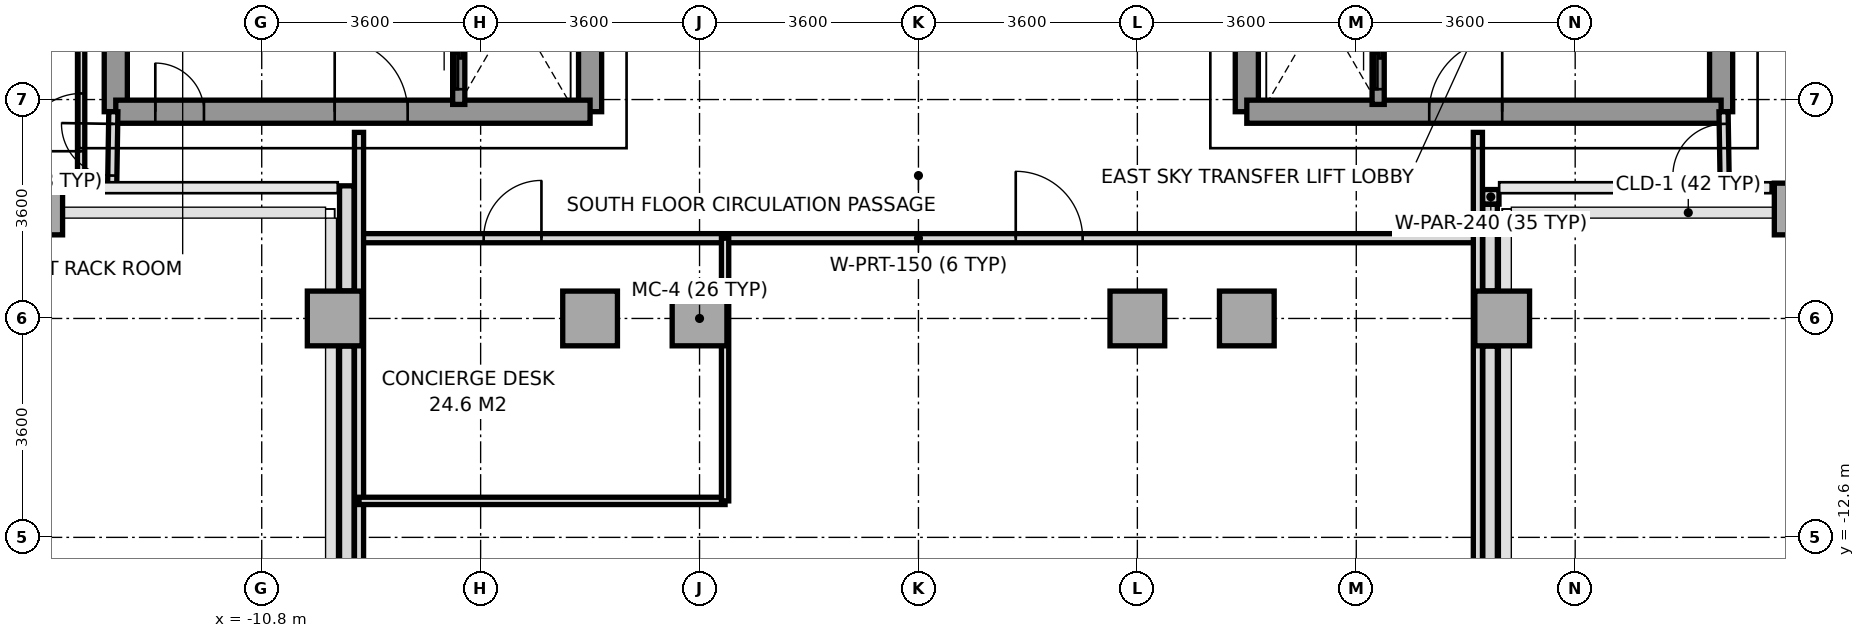
"""IFC4 building model, lengths in metres.
Left out: names, types, materials, properties, quantities, classifications, styles, units other than length and angle.
Written with IfcOpenShell. Run it as: python <this file> out.ifc"""

import sys

from ifc_helpers import new_model, si_unit, direction, frame, frame_2d, origin, origin_2d, place, context, subcontext, project, spatial, rectangle, extrude, source, transform, mapped, element, fill, save


model = new_model("IFC4")
c1 = context("Model", 3, precision=1e-05, world=origin(), true_north=direction((0.0, 1.0)))
c2 = subcontext(c1, "Body", "Model", "MODEL_VIEW")
j1 = project(units=[si_unit("LENGTHUNIT", "METRE"), si_unit("PLANEANGLEUNIT", "RADIAN")], contexts=[c1])
p1 = place(None, origin())
s1 = spatial("IfcSite", under=j1, at=p1, CompositionType="ELEMENT")
p2 = place(p1, origin())
s2 = spatial("IfcBuilding", under=s1, at=p2, CompositionType="ELEMENT")
p3 = place(p2, frame((0.0, 0.0, 177.4)))
s3 = spatial("IfcBuildingStorey", under=s2, at=p3, CompositionType="ELEMENT", Elevation=177.4)
m1 = source(origin(), c2, "Body", "SweptSolid", [
    extrude(rectangle(XDim=0.65, YDim=0.85, at=origin_2d()), origin(), (0.0, 0.0, 1.0), 3.2),
])
p4 = place(p3, frame((-14.4, -7.2, 0.0), z_axis=(0.0, 0.0, 1.0), x_axis=(1.0, 0.0, 0.0)))
e1 = element("IfcColumn", 1, at=p4, inside=s3, PredefinedType="COLUMN", context=c2, shape_type="MappedRepresentation", body=[
    mapped(m1, transform((0.0, 0.0, 0.0), x_axis=(1.0, 0.0, 0.0), y_axis=(0.0, 1.0, 0.0), z_axis=(0.0, 0.0, 1.0), scale=1.0)),
])
m2 = source(origin(), c2, "Body", "SweptSolid", [
    extrude(rectangle(XDim=0.9, YDim=0.9, at=origin_2d()), origin(), (0.0, 0.0, 1.0), 3.2),
])
for number, where, z_axis, x_axis in (
    (2, (-9.6, -9.0, 0.0), (0.0, 0.0, 1.0), (1.0, 0.0, 0.0)),
    (3, (-5.4, -9.0, 0.0), (0.0, 0.0, 1.0), (1.0, 0.0, 0.0)),
    (4, (-3.6, -9.0, 0.0), (0.0, 0.0, 1.0), (1.0, 0.0, 0.0)),
    (5, (3.6, -9.0, 0.0), (0.0, 0.0, 1.0), (1.0, 0.0, 0.0)),
    (6, (5.4, -9.0, 0.0), (0.0, 0.0, 1.0), (1.0, 0.0, 0.0)),
    (7, (9.6, -9.0, 0.0), (0.0, 0.0, 1.0), (1.0, 0.0, 0.0)),
):
    element("IfcColumn", number, at=place(p3, frame(where, z_axis=z_axis, x_axis=x_axis)), inside=s3, PredefinedType="COLUMN", context=c2, shape_type="MappedRepresentation", body=[
        mapped(m2, transform((0.0, 0.0, 0.0), x_axis=(1.0, 0.0, 0.0), y_axis=(0.0, 1.0, 0.0), z_axis=(0.0, 0.0, 1.0), scale=1.0)),
    ])
p5 = place(p3, frame((14.4, -7.2, 0.0), z_axis=(0.0, 0.0, 1.0), x_axis=(1.0, 0.0, 0.0)))
e8 = element("IfcColumn", 8, at=p5, inside=s3, PredefinedType="COLUMN", context=c2, shape_type="MappedRepresentation", body=[
    mapped(m1, transform((0.0, 0.0, 0.0), x_axis=(1.0, 0.0, 0.0), y_axis=(0.0, 1.0, 0.0), z_axis=(0.0, 0.0, 1.0), scale=1.0)),
])
p6 = place(p3, frame((9.547, -7.0, 0.0), z_axis=(0.0, 0.0, 1.0), x_axis=(-1.0, 0.0, 0.0)))
e9 = element("IfcWall", 9, at=p6, inside=s3, PredefinedType="PARAPET", context=c2, shape_type="SweptSolid", body=[
    extrude(rectangle(XDim=0.269, YDim=0.24, at=frame_2d((0.135, 0.0))), origin(), (0.0, 0.0, 1.0), 1.15),
])
p7 = place(p3, frame((9.4, -7.123, 0.0), z_axis=(0.0, 0.0, 1.0), x_axis=(0.0, -1.0, 0.0)))
e10 = element("IfcWall", 10, at=p7, inside=s3, PredefinedType="PARAPET", context=c2, shape_type="SweptSolid", body=[
    extrude(rectangle(XDim=1.424, YDim=0.24, at=frame_2d((0.712, 0.0))), origin(), (0.0, 0.0, 1.0), 1.15),
])
p8 = place(p3, frame((9.4, -9.453, 0.0), z_axis=(0.0, 0.0, 1.0), x_axis=(0.0, -1.0, 0.0)))
e11 = element("IfcWall", 11, at=p8, inside=s3, PredefinedType="PARAPET", context=c2, shape_type="SweptSolid", body=[
    extrude(rectangle(XDim=6.15, YDim=0.24, at=frame_2d((3.075, 0.0))), origin(), (0.0, 0.0, 1.0), 1.15),
])
p9 = place(p3, frame((-9.4, -15.358, 0.0), z_axis=(0.0, 0.0, 1.0), x_axis=(0.0, 1.0, 0.0)))
e12 = element("IfcWall", 12, at=p9, inside=s3, PredefinedType="PARAPET", context=c2, shape_type="SweptSolid", body=[
    extrude(rectangle(XDim=5.905, YDim=0.24, at=frame_2d((2.952, 0.0))), origin(), (0.0, 0.0, 1.0), 1.15),
])
p10 = place(p3, frame((-9.4, -8.547, 0.0), z_axis=(0.0, 0.0, 1.0), x_axis=(0.0, 1.0, 0.0)))
e13 = element("IfcWall", 13, at=p10, inside=s3, PredefinedType="PARAPET", context=c2, shape_type="SweptSolid", body=[
    extrude(rectangle(XDim=1.728, YDim=0.24, at=frame_2d((0.864, 0.0))), origin(), (0.0, 0.0, 1.0), 1.15),
])
p11 = place(p3, frame((-13.2, -5.6, 0.0), z_axis=(0.0, 0.0, 1.0), x_axis=(0.0, 1.0, 0.0)))
e14 = element("IfcWall", 14, at=p11, inside=s3, PredefinedType="SHEAR", context=c2, shape_type="SweptSolid", body=[
    extrude(rectangle(XDim=11.2, YDim=0.38, at=frame_2d((5.6, 0.0))), origin(), (0.0, 0.0, 1.0), 3.2),
])
p12 = place(p3, frame((-5.4, -5.6, 0.0), z_axis=(0.0, 0.0, 1.0), x_axis=(0.0, 1.0, 0.0)))
e15 = element("IfcWall", 15, at=p12, inside=s3, PredefinedType="SHEAR", context=c2, shape_type="SweptSolid", body=[
    extrude(rectangle(XDim=12.5, YDim=0.38, at=frame_2d((6.25, 0.0))), origin(), (0.0, 0.0, 1.0), 3.2),
])
p13 = place(p12, frame((4.55, 0.0, 0.0)))
e16 = element("IfcOpeningElement", 16, at=p13, cuts=e15, PredefinedType="OPENING", context=c2, shape_type="SweptSolid", body=[
    extrude(rectangle(XDim=1.2, YDim=2.2, at=frame_2d((0.6, 1.1))), frame((0.0, 0.2, 0.0), z_axis=(0.0, -1.0, 0.0), x_axis=(1.0, 0.0, 0.0)), (0.0, 0.0, 1.0), 0.4),
])
p14 = place(p12, frame((10.45, 0.0, 0.0)))
e17 = element("IfcOpeningElement", 17, at=p14, cuts=e15, PredefinedType="OPENING", context=c2, shape_type="SweptSolid", body=[
    extrude(rectangle(XDim=1.2, YDim=2.2, at=frame_2d((0.6, 1.1))), frame((0.0, 0.2, 0.0), z_axis=(0.0, -1.0, 0.0), x_axis=(1.0, 0.0, 0.0)), (0.0, 0.0, 1.0), 0.4),
])
p15 = place(p12, frame((6.86, 0.0, 0.0)))
e18 = element("IfcOpeningElement", 18, at=p15, cuts=e15, PredefinedType="OPENING", context=c2, shape_type="SweptSolid", body=[
    extrude(rectangle(XDim=0.8, YDim=2.1, at=frame_2d((0.4, 1.05))), frame((0.0, 0.2, 0.0), z_axis=(0.0, -1.0, 0.0), x_axis=(1.0, 0.0, 0.0)), (0.0, 0.0, 1.0), 0.4),
])
p16 = place(p3, frame((-13.2, -5.6, 0.0), z_axis=(0.0, 0.0, 1.0), x_axis=(1.0, 0.0, 0.0)))
e19 = element("IfcWall", 19, at=p16, inside=s3, PredefinedType="SHEAR", context=c2, shape_type="SweptSolid", body=[
    extrude(rectangle(XDim=7.8, YDim=0.38, at=frame_2d((3.9, 0.0))), origin(), (0.0, 0.0, 1.0), 3.2),
])
p17 = place(p16, frame((3.6, 0.0, 0.0)))
e20 = element("IfcOpeningElement", 20, at=p17, cuts=e19, PredefinedType="OPENING", context=c2, shape_type="SweptSolid", body=[
    extrude(rectangle(XDim=1.2, YDim=2.2, at=frame_2d((0.6, 1.1))), frame((0.0, 0.2, 0.0), z_axis=(0.0, -1.0, 0.0), x_axis=(1.0, 0.0, 0.0)), (0.0, 0.0, 1.0), 0.4),
])
p18 = place(p16, frame((0.65, 0.0, 0.0)))
e21 = element("IfcOpeningElement", 21, at=p18, cuts=e19, PredefinedType="OPENING", context=c2, shape_type="SweptSolid", body=[
    extrude(rectangle(XDim=0.8, YDim=2.1, at=frame_2d((0.4, 1.05))), frame((0.0, 0.2, 0.0), z_axis=(0.0, -1.0, 0.0), x_axis=(1.0, 0.0, 0.0)), (0.0, 0.0, 1.0), 0.4),
])
p19 = place(p3, frame((13.2, -5.6, 0.0), z_axis=(0.0, 0.0, 1.0), x_axis=(0.0, 1.0, 0.0)))
e22 = element("IfcWall", 22, at=p19, inside=s3, PredefinedType="SHEAR", context=c2, shape_type="SweptSolid", body=[
    extrude(rectangle(XDim=11.2, YDim=0.38, at=frame_2d((5.6, 0.0))), origin(), (0.0, 0.0, 1.0), 3.2),
])
p20 = place(p3, frame((5.4, -5.6, 0.0), z_axis=(0.0, 0.0, 1.0), x_axis=(0.0, 1.0, 0.0)))
e23 = element("IfcWall", 23, at=p20, inside=s3, PredefinedType="SHEAR", context=c2, shape_type="SweptSolid", body=[
    extrude(rectangle(XDim=12.5, YDim=0.38, at=frame_2d((6.25, 0.0))), origin(), (0.0, 0.0, 1.0), 3.2),
])
p21 = place(p20, frame((4.55, 0.0, 0.0)))
e24 = element("IfcOpeningElement", 24, at=p21, cuts=e23, PredefinedType="OPENING", context=c2, shape_type="SweptSolid", body=[
    extrude(rectangle(XDim=1.2, YDim=2.2, at=frame_2d((0.6, 1.1))), frame((0.0, 0.2, 0.0), z_axis=(0.0, -1.0, 0.0), x_axis=(1.0, 0.0, 0.0)), (0.0, 0.0, 1.0), 0.4),
])
p22 = place(p20, frame((10.45, 0.0, 0.0)))
e25 = element("IfcOpeningElement", 25, at=p22, cuts=e23, PredefinedType="OPENING", context=c2, shape_type="SweptSolid", body=[
    extrude(rectangle(XDim=1.2, YDim=2.2, at=frame_2d((0.6, 1.1))), frame((0.0, 0.2, 0.0), z_axis=(0.0, -1.0, 0.0), x_axis=(1.0, 0.0, 0.0)), (0.0, 0.0, 1.0), 0.4),
])
p23 = place(p20, frame((6.86, 0.0, 0.0)))
e26 = element("IfcOpeningElement", 26, at=p23, cuts=e23, PredefinedType="OPENING", context=c2, shape_type="SweptSolid", body=[
    extrude(rectangle(XDim=0.8, YDim=2.1, at=frame_2d((0.4, 1.05))), frame((0.0, 0.2, 0.0), z_axis=(0.0, -1.0, 0.0), x_axis=(1.0, 0.0, 0.0)), (0.0, 0.0, 1.0), 0.4),
])
p24 = place(p3, frame((5.4, -5.6, 0.0), z_axis=(0.0, 0.0, 1.0), x_axis=(1.0, 0.0, 0.0)))
e27 = element("IfcWall", 27, at=p24, inside=s3, PredefinedType="SHEAR", context=c2, shape_type="SweptSolid", body=[
    extrude(rectangle(XDim=7.8, YDim=0.38, at=frame_2d((3.9, 0.0))), origin(), (0.0, 0.0, 1.0), 3.2),
])
p25 = place(p24, frame((3.0, 0.0, 0.0)))
e28 = element("IfcOpeningElement", 28, at=p25, cuts=e27, PredefinedType="OPENING", context=c2, shape_type="SweptSolid", body=[
    extrude(rectangle(XDim=1.2, YDim=2.2, at=frame_2d((0.6, 1.1))), frame((0.0, 0.2, 0.0), z_axis=(0.0, -1.0, 0.0), x_axis=(1.0, 0.0, 0.0)), (0.0, 0.0, 1.0), 0.4),
])
p26 = place(p3, frame((-7.56, -5.48, 0.0), z_axis=(0.0, 0.0, 1.0), x_axis=(0.0, 1.0, 0.0)))
e29 = element("IfcWall", 29, at=p26, inside=s3, PredefinedType="SOLIDWALL", context=c2, shape_type="SweptSolid", body=[
    extrude(rectangle(XDim=1.6, YDim=0.2, at=frame_2d((0.8, 0.0))), origin(), (0.0, 0.0, 1.0), 3.2),
])
p27 = place(p26, frame((0.25, 0.0, 0.0)))
e30 = element("IfcOpeningElement", 30, at=p27, cuts=e29, PredefinedType="OPENING", context=c2, shape_type="SweptSolid", body=[
    extrude(rectangle(XDim=1.1, YDim=2.2, at=frame_2d((0.55, 1.1))), frame((0.0, 0.11, 0.0), z_axis=(0.0, -1.0, 0.0), x_axis=(1.0, 0.0, 0.0)), (0.0, 0.0, 1.0), 0.22),
])
p28 = place(p3, frame((7.56, -5.48, 0.0), z_axis=(0.0, 0.0, 1.0), x_axis=(0.0, 1.0, 0.0)))
e31 = element("IfcWall", 31, at=p28, inside=s3, PredefinedType="SOLIDWALL", context=c2, shape_type="SweptSolid", body=[
    extrude(rectangle(XDim=1.6, YDim=0.2, at=frame_2d((0.8, 0.0))), origin(), (0.0, 0.0, 1.0), 3.2),
])
p29 = place(p28, frame((0.25, 0.0, 0.0)))
e32 = element("IfcOpeningElement", 32, at=p29, cuts=e31, PredefinedType="OPENING", context=c2, shape_type="SweptSolid", body=[
    extrude(rectangle(XDim=1.1, YDim=2.2, at=frame_2d((0.55, 1.1))), frame((0.0, 0.11, 0.0), z_axis=(0.0, -1.0, 0.0), x_axis=(1.0, 0.0, 0.0)), (0.0, 0.0, 1.0), 0.22),
])
p30 = place(p3, frame((-9.2, -7.68, 0.0), z_axis=(0.0, 0.0, 1.0), x_axis=(1.0, 0.0, 0.0)))
e33 = element("IfcWall", 33, at=p30, inside=s3, PredefinedType="PARTITIONING", context=c2, shape_type="SweptSolid", body=[
    extrude(rectangle(XDim=18.4, YDim=0.15, at=frame_2d((9.2, 0.0))), origin(), (0.0, 0.0, 1.0), 2.8),
])
p31 = place(p30, frame((2.05, 0.0, 0.0)))
e34 = element("IfcOpeningElement", 34, at=p31, cuts=e33, PredefinedType="OPENING", context=c2, shape_type="SweptSolid", body=[
    extrude(rectangle(XDim=0.95, YDim=2.15, at=frame_2d((0.475, 1.075))), frame((0.0, 0.085, 0.0), z_axis=(0.0, -1.0, 0.0), x_axis=(1.0, 0.0, 0.0)), (0.0, 0.0, 1.0), 0.17),
])
p32 = place(p30, frame((10.8, 0.0, 0.0)))
e35 = element("IfcOpeningElement", 35, at=p32, cuts=e33, PredefinedType="OPENING", context=c2, shape_type="SweptSolid", body=[
    extrude(rectangle(XDim=1.1, YDim=2.2, at=frame_2d((0.55, 1.1))), frame((0.0, 0.085, 0.0), z_axis=(0.0, -1.0, 0.0), x_axis=(1.0, 0.0, 0.0)), (0.0, 0.0, 1.0), 0.17),
])
for number, where, z_axis, x_axis in (
    (36, (-9.2, -15.68, 0.0), (0.0, 0.0, 1.0), (0.0, 1.0, 0.0)),
    (37, (9.2, -15.68, 0.0), (0.0, 0.0, 1.0), (0.0, 1.0, 0.0)),
):
    element("IfcWall", number, at=place(p3, frame(where, z_axis=z_axis, x_axis=x_axis)), inside=s3, PredefinedType="PARTITIONING", context=c2, shape_type="SweptSolid", body=[
        extrude(rectangle(XDim=9.74, YDim=0.15, at=frame_2d((4.87, 0.0))), origin(), (0.0, 0.0, 1.0), 2.75),
    ])
p33 = place(p3, frame((-9.2, -12.0, 0.0), z_axis=(0.0, 0.0, 1.0), x_axis=(1.0, 0.0, 0.0)))
e38 = element("IfcWall", 38, at=p33, inside=s3, PredefinedType="PARTITIONING", context=c2, shape_type="SweptSolid", body=[
    extrude(rectangle(XDim=6.02, YDim=0.12, at=frame_2d((3.01, 0.0))), origin(), (0.0, 0.0, 1.0), 3.2),
])
p34 = place(p3, frame((-3.18, -12.0, 0.0), z_axis=(0.0, 0.0, 1.0), x_axis=(0.0, 1.0, 0.0)))
e39 = element("IfcWall", 39, at=p34, inside=s3, PredefinedType="PARTITIONING", context=c2, shape_type="SweptSolid", body=[
    extrude(rectangle(XDim=4.32, YDim=0.12, at=frame_2d((2.16, 0.0))), origin(), (0.0, 0.0, 1.0), 2.75),
])
p35 = place(p3, frame((-13.26, -6.85, 0.0), z_axis=(0.0, 0.0, 1.0), x_axis=(0.016013571389, 0.999871774545, 0.0)))
e40 = element("IfcWall", 40, at=p35, inside=s3, PredefinedType="PARTITIONING", context=c2, shape_type="SweptSolid", body=[
    extrude(rectangle(XDim=1.25, YDim=0.15, at=frame_2d((0.625, 0.0))), origin(), (0.0, 0.0, 1.0), 3.2),
])
p36 = place(p35, frame((0.2, 0.0, 0.0)))
e41 = element("IfcOpeningElement", 41, at=p36, cuts=e40, PredefinedType="OPENING", context=c2, shape_type="SweptSolid", body=[
    extrude(rectangle(XDim=0.85, YDim=2.1, at=frame_2d((0.425, 1.05))), frame((0.0, 0.085, 0.0), z_axis=(0.0, -1.0, 0.0), x_axis=(1.0, 0.0, 0.0)), (0.0, 0.0, 1.0), 0.17),
])
p37 = place(p3, frame((-13.77, -6.85, 0.0), z_axis=(0.0, 0.0, 1.0), x_axis=(0.0, 1.0, 0.0)))
e42 = element("IfcWall", 42, at=p37, inside=s3, PredefinedType="PARTITIONING", context=c2, shape_type="SweptSolid", body=[
    extrude(rectangle(XDim=13.7, YDim=0.12, at=frame_2d((6.85, 0.0))), origin(), (0.0, 0.0, 1.0), 2.87),
])
p38 = place(p37, frame((0.6, 0.0, 0.0)))
e43 = element("IfcOpeningElement", 43, at=p38, cuts=e42, PredefinedType="OPENING", context=c2, shape_type="SweptSolid", body=[
    extrude(rectangle(XDim=0.95, YDim=2.15, at=frame_2d((0.475, 1.075))), frame((0.0, 0.07, 0.0), z_axis=(0.0, -1.0, 0.0), x_axis=(1.0, 0.0, 0.0)), (0.0, 0.0, 1.0), 0.14),
])
p39 = place(p3, frame((13.26, -6.85, 0.0), z_axis=(0.0, 0.0, 1.0), x_axis=(-0.016013571389, 0.999871774545, 0.0)))
e44 = element("IfcWall", 44, at=p39, inside=s3, PredefinedType="PARTITIONING", context=c2, shape_type="SweptSolid", body=[
    extrude(rectangle(XDim=1.25, YDim=0.15, at=frame_2d((0.625, 0.0))), origin(), (0.0, 0.0, 1.0), 3.2),
])
p40 = place(p39, frame((0.2, 0.0, 0.0)))
e45 = element("IfcOpeningElement", 45, at=p40, cuts=e44, PredefinedType="OPENING", context=c2, shape_type="SweptSolid", body=[
    extrude(rectangle(XDim=0.85, YDim=2.1, at=frame_2d((0.425, 1.05))), frame((0.0, 0.085, 0.0), z_axis=(0.0, -1.0, 0.0), x_axis=(1.0, 0.0, 0.0)), (0.0, 0.0, 1.0), 0.17),
])
m3 = source(origin(), c2, "Body", "SweptSolid", [
    extrude(rectangle(XDim=1.2, YDim=2.2, at=frame_2d((0.6, 1.1))), frame((0.0, 0.025, 0.0), z_axis=(0.0, -1.0, 0.0), x_axis=(1.0, 0.0, 0.0)), (0.0, 0.0, 1.0), 0.05),
])
p41 = place(p17, origin())
e46 = element("IfcDoor", 46, at=p41, inside=s3, OperationType="SINGLE_SWING_LEFT", PredefinedType="DOOR", context=c2, shape_type="MappedRepresentation", body=[
    mapped(m3, transform((0.0, 0.0, 0.0), x_axis=(1.0, 0.0, 0.0), y_axis=(0.0, 1.0, 0.0), z_axis=(0.0, 0.0, 1.0), scale=1.0)),
])
fill(e20, e46)
p42 = place(p25, origin())
e47 = element("IfcDoor", 47, at=p42, inside=s3, OperationType="SINGLE_SWING_RIGHT", PredefinedType="DOOR", context=c2, shape_type="MappedRepresentation", body=[
    mapped(m3, transform((0.0, 0.0, 0.0), x_axis=(1.0, 0.0, 0.0), y_axis=(0.0, 1.0, 0.0), z_axis=(0.0, 0.0, 1.0), scale=1.0)),
])
fill(e28, e47)
m4 = source(origin(), c2, "Body", "SweptSolid", [
    extrude(rectangle(XDim=0.8, YDim=2.1, at=frame_2d((0.4, 1.05))), frame((0.0, 0.025, 0.0), z_axis=(0.0, -1.0, 0.0), x_axis=(1.0, 0.0, 0.0)), (0.0, 0.0, 1.0), 0.05),
])
p43 = place(p18, origin())
e48 = element("IfcDoor", 48, at=p43, inside=s3, OperationType="SINGLE_SWING_LEFT", PredefinedType="DOOR", context=c2, shape_type="MappedRepresentation", body=[
    mapped(m4, transform((0.0, 0.0, 0.0), x_axis=(1.0, 0.0, 0.0), y_axis=(0.0, 1.0, 0.0), z_axis=(0.0, 0.0, 1.0), scale=1.0)),
])
fill(e21, e48)
m5 = source(origin(), c2, "Body", "SweptSolid", [
    extrude(rectangle(XDim=1.1, YDim=2.2, at=frame_2d((0.55, 1.1))), frame((0.0, 0.025, 0.0), z_axis=(0.0, -1.0, 0.0), x_axis=(1.0, 0.0, 0.0)), (0.0, 0.0, 1.0), 0.05),
])
p44 = place(p27, origin())
e49 = element("IfcDoor", 49, at=p44, inside=s3, OperationType="SLIDING_TO_LEFT", PredefinedType="DOOR", context=c2, shape_type="MappedRepresentation", body=[
    mapped(m5, transform((0.0, 0.0, 0.0), x_axis=(1.0, 0.0, 0.0), y_axis=(0.0, 1.0, 0.0), z_axis=(0.0, 0.0, 1.0), scale=1.0)),
])
fill(e30, e49)
p45 = place(p29, origin())
e50 = element("IfcDoor", 50, at=p45, inside=s3, OperationType="SLIDING_TO_LEFT", PredefinedType="DOOR", context=c2, shape_type="MappedRepresentation", body=[
    mapped(m5, transform((0.0, 0.0, 0.0), x_axis=(1.0, 0.0, 0.0), y_axis=(0.0, 1.0, 0.0), z_axis=(0.0, 0.0, 1.0), scale=1.0)),
])
fill(e32, e50)
m6 = source(origin(), c2, "Body", "SweptSolid", [
    extrude(rectangle(XDim=0.95, YDim=2.15, at=frame_2d((0.475, 1.075))), frame((0.0, 0.025, 0.0), z_axis=(0.0, -1.0, 0.0), x_axis=(1.0, 0.0, 0.0)), (0.0, 0.0, 1.0), 0.05),
])
p46 = place(p31, origin())
e51 = element("IfcDoor", 51, at=p46, inside=s3, OperationType="SINGLE_SWING_RIGHT", PredefinedType="DOOR", context=c2, shape_type="MappedRepresentation", body=[
    mapped(m6, transform((0.0, 0.0, 0.0), x_axis=(1.0, 0.0, 0.0), y_axis=(0.0, 1.0, 0.0), z_axis=(0.0, 0.0, 1.0), scale=1.0)),
])
fill(e34, e51)
p47 = place(p32, origin())
e52 = element("IfcDoor", 52, at=p47, inside=s3, OperationType="SINGLE_SWING_LEFT", PredefinedType="DOOR", context=c2, shape_type="MappedRepresentation", body=[
    mapped(m5, transform((0.0, 0.0, 0.0), x_axis=(1.0, 0.0, 0.0), y_axis=(0.0, 1.0, 0.0), z_axis=(0.0, 0.0, 1.0), scale=1.0)),
])
fill(e35, e52)
p48 = place(p38, origin())
e53 = element("IfcDoor", 53, at=p48, inside=s3, OperationType="SINGLE_SWING_LEFT", PredefinedType="DOOR", context=c2, shape_type="MappedRepresentation", body=[
    mapped(m6, transform((0.0, 0.0, 0.0), x_axis=(1.0, 0.0, 0.0), y_axis=(0.0, 1.0, 0.0), z_axis=(0.0, 0.0, 1.0), scale=1.0)),
])
fill(e43, e53)
m7 = source(origin(), c2, "Body", "SweptSolid", [
    extrude(rectangle(XDim=0.85, YDim=2.1, at=frame_2d((0.425, 1.05))), frame((0.0, 0.025, 0.0), z_axis=(0.0, -1.0, 0.0), x_axis=(1.0, 0.0, 0.0)), (0.0, 0.0, 1.0), 0.05),
])
p49 = place(p36, origin())
e54 = element("IfcDoor", 54, at=p49, inside=s3, OperationType="SINGLE_SWING_RIGHT", PredefinedType="DOOR", context=c2, shape_type="MappedRepresentation", body=[
    mapped(m7, transform((0.0, 0.0, 0.0), x_axis=(1.0, 0.0, 0.0), y_axis=(0.0, 1.0, 0.0), z_axis=(0.0, 0.0, 1.0), scale=1.0)),
])
fill(e41, e54)
p50 = place(p40, origin())
e55 = element("IfcDoor", 55, at=p50, inside=s3, OperationType="SINGLE_SWING_LEFT", PredefinedType="DOOR", context=c2, shape_type="MappedRepresentation", body=[
    mapped(m7, transform((0.0, 0.0, 0.0), x_axis=(1.0, 0.0, 0.0), y_axis=(0.0, 1.0, 0.0), z_axis=(0.0, 0.0, 1.0), scale=1.0)),
])
fill(e45, e55)
save(model, sys.argv[1])
